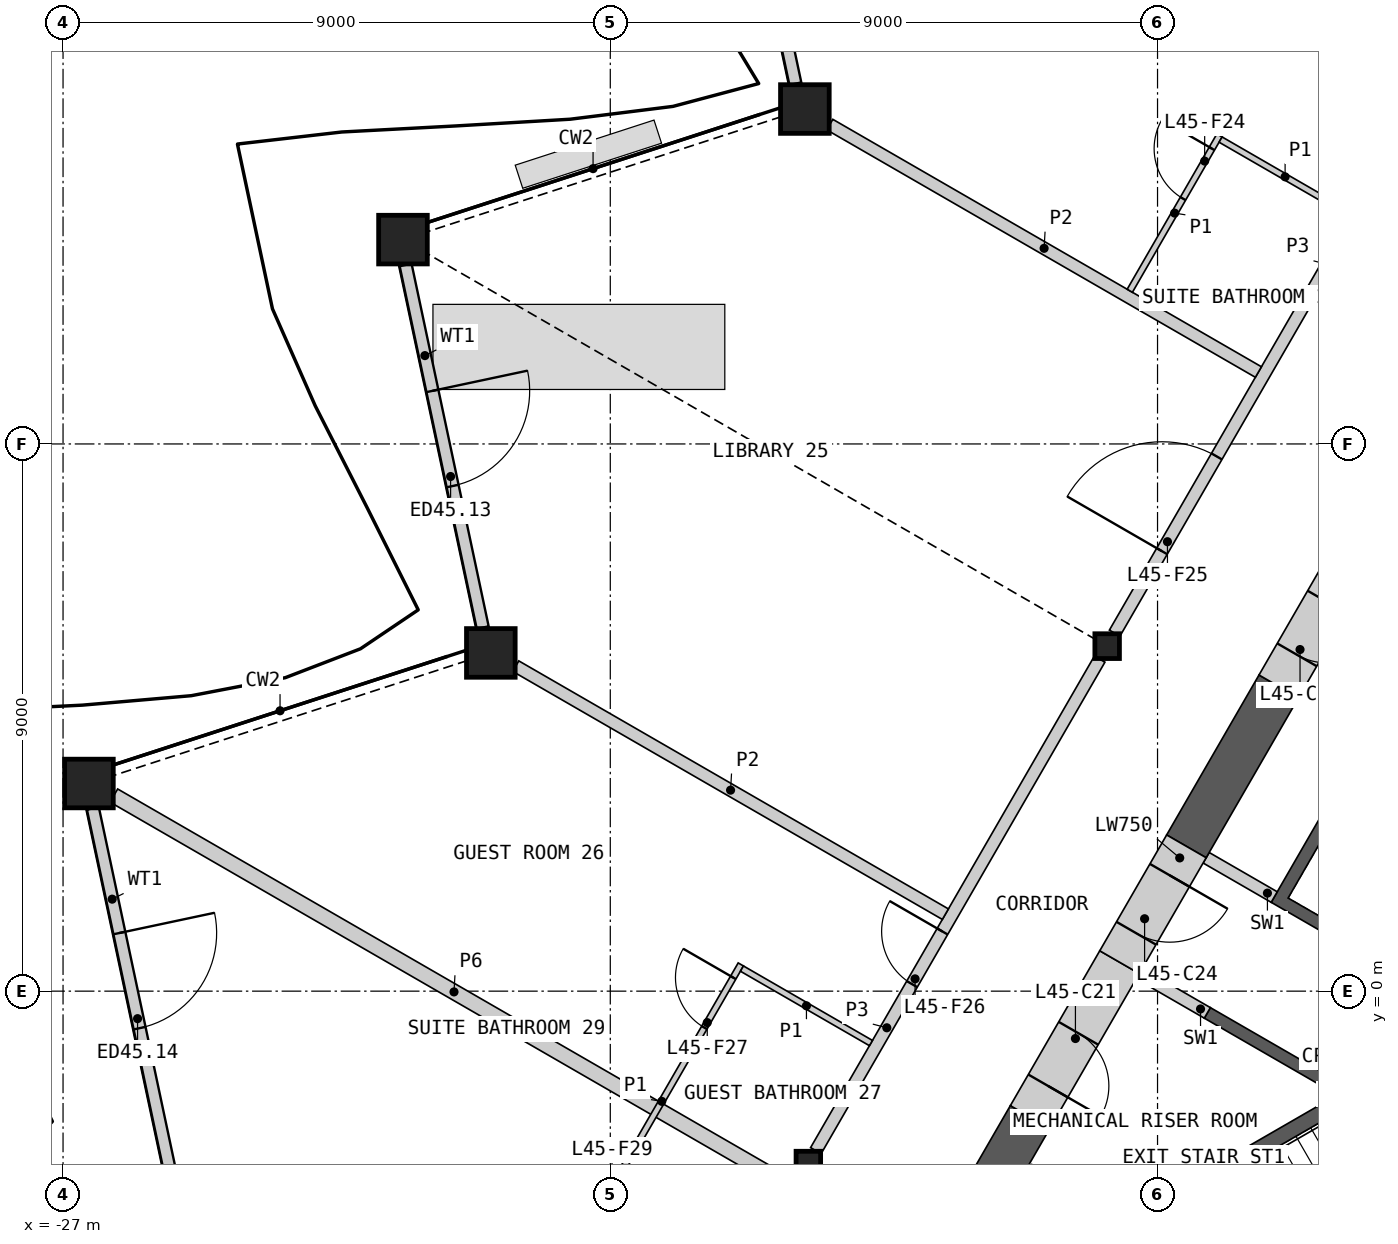
"""IFC4 building model, lengths in metres.
Left out: names, types, materials, properties, quantities, classifications, styles, units other than length and angle.
Written with IfcOpenShell. Run it as: python <this file> out.ifc"""

import sys

from ifc_helpers import new_model, si_unit, direction, frame, frame_2d, origin, origin_2d, place, context, subcontext, project, spatial, polyline, rectangle, hollow_rectangle, i_section, outline, extrude, element, fill, save


model = new_model("IFC4")
c1 = context("Model", 3, precision=1e-05, world=origin(), true_north=direction((0.0, 1.0)))
c2 = subcontext(c1, "Body", "Model", "MODEL_VIEW")
j1 = project(units=[si_unit("LENGTHUNIT", "METRE"), si_unit("PLANEANGLEUNIT", "RADIAN")], contexts=[c1])
p1 = place(None, origin())
s1 = spatial("IfcSite", under=j1, at=p1, CompositionType="ELEMENT")
p2 = place(p1, origin())
s2 = spatial("IfcBuilding", under=s1, at=p2, CompositionType="ELEMENT")
p3 = place(p2, frame((0.0, 0.0, 205.2)))
s3 = spatial("IfcBuildingStorey", under=s2, at=p3, CompositionType="ELEMENT", Elevation=205.2)
for number, where, z_axis, x_axis in (
    (1, (-14.8, 14.508, 0.0), (0.0, 0.0, 1.0), (1.0, 0.0, 0.0)),
    (2, (-21.409, 12.361, 0.0), (0.0, 0.0, 1.0), (1.0, 0.0, 0.0)),
    (3, (-19.965, 5.563, 0.0), (0.0, 0.0, 1.0), (1.0, 0.0, 0.0)),
    (4, (-26.574, 3.415, 0.0), (0.0, 0.0, 1.0), (1.0, 0.0, 0.0)),
):
    element("IfcColumn", number, at=place(p3, frame(where, z_axis=z_axis, x_axis=x_axis)), inside=s3, PredefinedType="COLUMN", context=c2, shape_type="SweptSolid", body=[
        extrude(hollow_rectangle(XDim=0.8, YDim=0.8, WallThickness=0.05, at=origin_2d()), origin(), (0.0, 0.0, 1.0), 3.6),
    ])
for number, where, z_axis, x_axis in (
    (5, (-9.828, 5.675, 0.0), (0.0, 0.0, 1.0), (1.0, 0.0, 0.0)),
    (6, (-14.743, -2.837, 0.0), (0.0, 0.0, 1.0), (1.0, 0.0, 0.0)),
):
    element("IfcColumn", number, at=place(p3, frame(where, z_axis=z_axis, x_axis=x_axis)), inside=s3, PredefinedType="COLUMN", context=c2, shape_type="SweptSolid", body=[
        extrude(i_section(OverallWidth=0.404, OverallDepth=0.407, WebThickness=0.027, FlangeThickness=0.044, at=origin_2d()), origin(), (0.0, 0.0, 1.0), 3.6),
    ])
p4 = place(p3, frame((-16.224, 20.89, 0.0), z_axis=(0.0, 0.0, 1.0), x_axis=(0.207912864597, -0.978147351238, 0.0)))
e7 = element("IfcWall", 7, at=p4, inside=s3, PredefinedType="SOLIDWALL", context=c2, shape_type="SweptSolid", body=[
    extrude(rectangle(XDim=6.098, YDim=0.2, at=frame_2d((3.049, 0.0))), origin(), (0.0, 0.0, 1.0), 2.701),
])
p5 = place(p4, frame((2.147, 0.0, 0.0)))
e8 = element("IfcOpeningElement", 8, at=p5, cuts=e7, PredefinedType="OPENING", context=c2, shape_type="SweptSolid", body=[
    extrude(rectangle(XDim=1.6, YDim=2.4, at=frame_2d((0.8, 1.2))), frame((0.0, 0.11, 0.0), z_axis=(0.0, -1.0, 0.0), x_axis=(1.0, 0.0, 0.0)), (0.0, 0.0, 1.0), 0.22),
])
p6 = place(p3, frame((-21.366, 11.944, 0.0), z_axis=(0.0, 0.0, 1.0), x_axis=(0.207912864597, -0.978147351238, 0.0)))
e9 = element("IfcWall", 9, at=p6, inside=s3, PredefinedType="SOLIDWALL", context=c2, shape_type="SweptSolid", body=[
    extrude(rectangle(XDim=6.098, YDim=0.2, at=frame_2d((3.049, 0.0))), origin(), (0.0, 0.0, 1.0), 2.701),
])
p7 = place(p6, frame((2.117, 0.0, 0.0)))
e10 = element("IfcOpeningElement", 10, at=p7, cuts=e9, PredefinedType="OPENING", context=c2, shape_type="SweptSolid", body=[
    extrude(rectangle(XDim=1.6, YDim=2.4, at=frame_2d((0.8, 1.2))), frame((0.0, 0.11, 0.0), z_axis=(0.0, -1.0, 0.0), x_axis=(1.0, 0.0, 0.0)), (0.0, 0.0, 1.0), 0.22),
])
p8 = place(p3, frame((-26.51, 3.006, 0.0), z_axis=(0.0, 0.0, 1.0), x_axis=(0.207920445063, -0.978145739921, 0.0)))
e11 = element("IfcWall", 11, at=p8, inside=s3, PredefinedType="SOLIDWALL", context=c2, shape_type="SweptSolid", body=[
    extrude(rectangle(XDim=6.106, YDim=0.2, at=frame_2d((3.053, 0.0))), origin(), (0.0, 0.0, 1.0), 2.701),
])
p9 = place(p8, frame((2.096, 0.0, 0.0)))
e12 = element("IfcOpeningElement", 12, at=p9, cuts=e11, PredefinedType="OPENING", context=c2, shape_type="SweptSolid", body=[
    extrude(rectangle(XDim=1.6, YDim=2.4, at=frame_2d((0.8, 1.2))), frame((0.0, 0.11, 0.0), z_axis=(0.0, -1.0, 0.0), x_axis=(1.0, 0.0, 0.0)), (0.0, 0.0, 1.0), 0.22),
])
p10 = place(p3, origin())
e13 = element("IfcWall", 13, at=p10, inside=s3, PredefinedType="SHEAR", context=c2, shape_type="SweptSolid", body=[
    extrude(outline(polyline([(-6.061, -1.697), (-8.231, -0.444), (-8.131, -0.271), (-5.96, -1.524), (-6.061, -1.697)])), origin(), (0.0, 0.0, 1.0), 3.25),
])
p11 = place(p3, origin())
e14 = element("IfcWall", 14, at=p11, inside=s3, PredefinedType="SHEAR", context=c2, shape_type="SweptSolid", body=[
    extrude(outline(polyline([(-4.96, 0.208), (-7.131, 1.461), (-3.731, 7.35), (-1.561, 6.097), (-1.66, 5.924), (-3.652, 7.074), (-4.652, 5.342), (-2.66, 4.192), (-2.76, 4.019), (-4.752, 5.169), (-5.752, 3.437), (-3.76, 2.287), (-3.861, 2.113), (-5.852, 3.263), (-6.852, 1.531), (-4.861, 0.381), (-4.96, 0.208)])), origin(), (0.0, 0.0, 1.0), 3.25),
])
for number, where, z_axis, x_axis in (
    (15, (-7.081, 1.548, 0.0), (0.0, 0.0, 1.0), (-0.866, 0.5, 0.0)),
    (16, (-8.181, -0.357, 0.0), (0.0, 0.0, 1.0), (-0.866, 0.5, 0.0)),
):
    element("IfcWall", number, at=place(p3, frame(where, z_axis=z_axis, x_axis=x_axis)), inside=s3, PredefinedType="SHEAR", context=c2, shape_type="SweptSolid", body=[
        extrude(rectangle(XDim=1.293, YDim=0.2, at=frame_2d((0.646, 0.0))), origin(), (0.0, 0.0, 1.0), 3.25),
    ])
p12 = place(p3, origin())
e17 = element("IfcWall", 17, at=p12, inside=s3, PredefinedType="SHEAR", context=c2, shape_type="SweptSolid", body=[
    extrude(outline(polyline([(-5.307, -1.281), (-10.374, -4.206), (-10.032, -4.298), (-5.182, -1.498), (-5.307, -1.281)])), origin(), (0.0, 0.0, 1.0), 3.25),
])
p13 = place(p3, frame((-7.006, 5.012, 0.0), z_axis=(0.0, 0.0, 1.0), x_axis=(-0.49996826437, -0.866043725583, 0.0)))
e18 = element("IfcWall", 18, at=p13, inside=s3, PredefinedType="SHEAR", context=c2, shape_type="SweptSolid", body=[
    extrude(rectangle(XDim=3.038, YDim=0.75, at=frame_2d((1.519, 0.0))), origin(), (0.0, 0.0, 1.0), 3.25),
])
p14 = place(p3, frame((-11.096, -2.07, 0.0), z_axis=(0.0, 0.0, 1.0), x_axis=(-0.49992834617, -0.86606676919, 0.0)))
e19 = element("IfcWall", 19, at=p14, inside=s3, PredefinedType="SHEAR", context=c2, shape_type="SweptSolid", body=[
    extrude(rectangle(XDim=2.737, YDim=0.75, at=frame_2d((1.369, 0.0))), origin(), (0.0, 0.0, 1.0), 3.25),
])
p15 = place(p3, frame((-5.906, 6.918, 0.0), z_axis=(0.0, 0.0, 1.0), x_axis=(-0.499946605688, -0.86605622881, 0.0)))
e20 = element("IfcWall", 20, at=p15, inside=s3, PredefinedType="SHEAR", context=c2, shape_type="SweptSolid", body=[
    extrude(rectangle(XDim=2.2, YDim=0.75, at=frame_2d((1.1, 0.0))), origin(), (0.0, 0.0, 1.0), 3.25),
])
p16 = place(p15, frame((0.6, 0.0, 0.0)))
e21 = element("IfcOpeningElement", 21, at=p16, cuts=e20, PredefinedType="OPENING", context=c2, shape_type="SweptSolid", body=[
    extrude(rectangle(XDim=1.0, YDim=2.1, at=frame_2d((0.5, 1.05))), frame((0.0, 0.385, 0.0), z_axis=(0.0, -1.0, 0.0), x_axis=(1.0, 0.0, 0.0)), (0.0, 0.0, 1.0), 0.77),
])
p17 = place(p3, frame((-9.625, 0.477, 0.0), z_axis=(0.0, 0.0, 1.0), x_axis=(-0.500005104963, -0.866022456413, 0.0)))
e22 = element("IfcWall", 22, at=p17, inside=s3, PredefinedType="SHEAR", context=c2, shape_type="SweptSolid", body=[
    extrude(rectangle(XDim=2.941, YDim=0.75, at=frame_2d((1.47, 0.0))), origin(), (0.0, 0.0, 1.0), 3.25),
])
p18 = place(p17, frame((1.35, 0.0, 0.0)))
e23 = element("IfcOpeningElement", 23, at=p18, cuts=e22, PredefinedType="OPENING", context=c2, shape_type="SweptSolid", body=[
    extrude(rectangle(XDim=1.0, YDim=2.1, at=frame_2d((0.5, 1.05))), frame((0.0, 0.385, 0.0), z_axis=(0.0, -1.0, 0.0), x_axis=(1.0, 0.0, 0.0)), (0.0, 0.0, 1.0), 0.77),
])
p19 = place(p3, frame((-8.525, 2.382, 0.0), z_axis=(0.0, 0.0, 1.0), x_axis=(-0.500077893725, -0.86598042715, 0.0)))
e24 = element("IfcWall", 24, at=p19, inside=s3, PredefinedType="SHEAR", context=c2, shape_type="SweptSolid", body=[
    extrude(rectangle(XDim=2.2, YDim=0.75, at=frame_2d((1.1, 0.0))), origin(), (0.0, 0.0, 1.0), 3.25),
])
p20 = place(p19, frame((0.55, 0.0, 0.0)))
e25 = element("IfcOpeningElement", 25, at=p20, cuts=e24, PredefinedType="OPENING", context=c2, shape_type="SweptSolid", body=[
    extrude(rectangle(XDim=1.1, YDim=2.1, at=frame_2d((0.55, 1.05))), frame((0.0, 0.385, 0.0), z_axis=(0.0, -1.0, 0.0), x_axis=(1.0, 0.0, 0.0)), (0.0, 0.0, 1.0), 0.77),
])
p21 = place(p3, frame((-26.164, 3.217, 0.0), z_axis=(0.0, 0.0, 1.0), x_axis=(0.866026026416, -0.499998921569, 0.0)))
e26 = element("IfcWall", 26, at=p21, inside=s3, PredefinedType="PARTITIONING", context=c2, shape_type="SweptSolid", body=[
    extrude(rectangle(XDim=12.918, YDim=0.25, at=frame_2d((6.459, 0.0))), origin(), (0.0, 0.0, 1.0), 2.404),
])
p22 = place(p3, frame((-9.705, 5.888, 0.0), z_axis=(0.0, 0.0, 1.0), x_axis=(0.50000393355, 0.866023132736, 0.0)))
e27 = element("IfcWall", 27, at=p22, inside=s3, PredefinedType="PARTITIONING", context=c2, shape_type="SweptSolid", body=[
    extrude(rectangle(XDim=9.335, YDim=0.2, at=frame_2d((4.667, 0.0))), origin(), (0.0, 0.0, 1.0), 3.25),
])
p23 = place(p22, frame((1.556, 0.0, 0.0)))
e28 = element("IfcOpeningElement", 28, at=p23, cuts=e27, PredefinedType="OPENING", context=c2, shape_type="SweptSolid", body=[
    extrude(rectangle(XDim=1.8, YDim=2.1, at=frame_2d((0.9, 1.05))), frame((0.0, 0.11, 0.0), z_axis=(0.0, -1.0, 0.0), x_axis=(1.0, 0.0, 0.0)), (0.0, 0.0, 1.0), 0.22),
])
p24 = place(p3, frame((-14.619, -2.624, 0.0), z_axis=(0.0, 0.0, 1.0), x_axis=(0.50000393355, 0.866023132736, 0.0)))
e29 = element("IfcWall", 29, at=p24, inside=s3, PredefinedType="PARTITIONING", context=c2, shape_type="SweptSolid", body=[
    extrude(rectangle(XDim=9.335, YDim=0.2, at=frame_2d((4.667, 0.0))), origin(), (0.0, 0.0, 1.0), 3.25),
])
p25 = place(p24, frame((3.163, 0.0, 0.0)))
e30 = element("IfcOpeningElement", 30, at=p25, cuts=e29, PredefinedType="OPENING", context=c2, shape_type="SweptSolid", body=[
    extrude(rectangle(XDim=1.0, YDim=2.1, at=frame_2d((0.5, 1.05))), frame((0.0, 0.11, 0.0), z_axis=(0.0, -1.0, 0.0), x_axis=(1.0, 0.0, 0.0)), (0.0, 0.0, 1.0), 0.22),
])
p26 = place(p3, frame((-19.555, 5.345, 0.0), z_axis=(0.0, 0.0, 1.0), x_axis=(0.866026623601, -0.49999788721, 0.0)))
e31 = element("IfcWall", 31, at=p26, inside=s3, PredefinedType="PARTITIONING", context=c2, shape_type="SweptSolid", body=[
    extrude(rectangle(XDim=8.159, YDim=0.2, at=frame_2d((4.079, 0.0))), origin(), (0.0, 0.0, 1.0), 2.404),
])
p27 = place(p3, frame((-14.39, 14.252, 0.0), z_axis=(0.0, 0.0, 1.0), x_axis=(0.866028741424, -0.499994218994, 0.0)))
e32 = element("IfcWall", 32, at=p27, inside=s3, PredefinedType="PARTITIONING", context=c2, shape_type="SweptSolid", body=[
    extrude(rectangle(XDim=8.139, YDim=0.2, at=frame_2d((4.07, 0.0))), origin(), (0.0, 0.0, 1.0), 2.404),
])
p28 = place(p3, frame((-18.453, -4.064, 0.0), z_axis=(0.0, 0.0, 1.0), x_axis=(0.499971721724, 0.866041729639, 0.0)))
e33 = element("IfcWall", 33, at=p28, inside=s3, PredefinedType="PARTITIONING", context=c2, shape_type="SweptSolid", body=[
    extrude(rectangle(XDim=5.2, YDim=0.1, at=frame_2d((2.6, 0.0))), origin(), (0.0, 0.0, 1.0), 2.404),
])
p29 = place(p28, frame((4.0, 0.0, 0.0)))
e34 = element("IfcOpeningElement", 34, at=p29, cuts=e33, PredefinedType="OPENING", context=c2, shape_type="SweptSolid", body=[
    extrude(rectangle(XDim=0.95, YDim=2.1, at=frame_2d((0.475, 1.05))), frame((0.0, 0.06, 0.0), z_axis=(0.0, -1.0, 0.0), x_axis=(1.0, 0.0, 0.0)), (0.0, 0.0, 1.0), 0.12),
])
p30 = place(p28, frame((0.25, 0.0, 0.0)))
e35 = element("IfcOpeningElement", 35, at=p30, cuts=e33, PredefinedType="OPENING", context=c2, shape_type="SweptSolid", body=[
    extrude(rectangle(XDim=0.95, YDim=2.1, at=frame_2d((0.475, 1.05))), frame((0.0, 0.06, 0.0), z_axis=(0.0, -1.0, 0.0), x_axis=(1.0, 0.0, 0.0)), (0.0, 0.0, 1.0), 0.12),
])
p31 = place(p3, frame((-9.456, 11.519, 0.0), z_axis=(0.0, 0.0, 1.0), x_axis=(0.499939757307, 0.866060182126, 0.0)))
e36 = element("IfcWall", 36, at=p31, inside=s3, PredefinedType="PARTITIONING", context=c2, shape_type="SweptSolid", body=[
    extrude(rectangle(XDim=2.95, YDim=0.1, at=frame_2d((1.475, 0.0))), origin(), (0.0, 0.0, 1.0), 2.404),
])
p32 = place(p31, frame((1.75, 0.0, 0.0)))
e37 = element("IfcOpeningElement", 37, at=p32, cuts=e36, PredefinedType="OPENING", context=c2, shape_type="SweptSolid", body=[
    extrude(rectangle(XDim=0.95, YDim=2.1, at=frame_2d((0.475, 1.05))), frame((0.0, 0.06, 0.0), z_axis=(0.0, -1.0, 0.0), x_axis=(1.0, 0.0, 0.0)), (0.0, 0.0, 1.0), 0.12),
])
p33 = place(p3, frame((-7.963, 14.006, 0.0), z_axis=(0.0, 0.0, 1.0), x_axis=(0.866057815567, -0.499943856944, 0.0)))
e38 = element("IfcWall", 38, at=p33, inside=s3, PredefinedType="PARTITIONING", context=c2, shape_type="SweptSolid", body=[
    extrude(rectangle(XDim=2.45, YDim=0.1, at=frame_2d((1.225, 0.0))), origin(), (0.0, 0.0, 1.0), 2.404),
])
p34 = place(p3, frame((-15.835, 0.371, 0.0), z_axis=(0.0, 0.0, 1.0), x_axis=(0.866014668023, -0.500018594424, 0.0)))
e39 = element("IfcWall", 39, at=p34, inside=s3, PredefinedType="PARTITIONING", context=c2, shape_type="SweptSolid", body=[
    extrude(rectangle(XDim=2.45, YDim=0.1, at=frame_2d((1.225, 0.0))), origin(), (0.0, 0.0, 1.0), 2.404),
])
p35 = place(p7, origin())
e40 = element("IfcDoor", 40, at=p35, inside=s3, OperationType="DOUBLE_DOOR_SINGLE_SWING", PredefinedType="DOOR", context=c2, shape_type="SweptSolid", body=[
    extrude(rectangle(XDim=1.6, YDim=2.4, at=frame_2d((0.8, 1.2))), frame((0.0, 0.025, 0.0), z_axis=(0.0, -1.0, 0.0), x_axis=(1.0, 0.0, 0.0)), (0.0, 0.0, 1.0), 0.05),
])
fill(e10, e40)
p36 = place(p9, origin())
e41 = element("IfcDoor", 41, at=p36, inside=s3, OperationType="DOUBLE_DOOR_SINGLE_SWING", PredefinedType="DOOR", context=c2, shape_type="SweptSolid", body=[
    extrude(rectangle(XDim=1.6, YDim=2.4, at=frame_2d((0.8, 1.2))), frame((0.0, 0.025, 0.0), z_axis=(0.0, -1.0, 0.0), x_axis=(1.0, 0.0, 0.0)), (0.0, 0.0, 1.0), 0.05),
])
fill(e12, e41)
p37 = place(p16, origin())
e42 = element("IfcDoor", 42, at=p37, inside=s3, OperationType="SINGLE_SWING_LEFT", PredefinedType="DOOR", context=c2, shape_type="SweptSolid", body=[
    extrude(rectangle(XDim=1.0, YDim=2.1, at=frame_2d((0.5, 1.05))), frame((0.0, 0.13, 0.0), z_axis=(0.0, -1.0, 0.0), x_axis=(1.0, 0.0, 0.0)), (0.0, 0.0, 1.0), 0.05),
])
fill(e21, e42)
p38 = place(p18, origin())
e43 = element("IfcDoor", 43, at=p38, inside=s3, OperationType="SINGLE_SWING_RIGHT", PredefinedType="DOOR", context=c2, shape_type="SweptSolid", body=[
    extrude(rectangle(XDim=1.0, YDim=2.1, at=frame_2d((0.5, 1.05))), frame((0.0, 0.13, 0.0), z_axis=(0.0, -1.0, 0.0), x_axis=(1.0, 0.0, 0.0)), (0.0, 0.0, 1.0), 0.05),
])
fill(e23, e43)
p39 = place(p20, origin())
e44 = element("IfcDoor", 44, at=p39, inside=s3, OperationType="SINGLE_SWING_LEFT", PredefinedType="DOOR", context=c2, shape_type="SweptSolid", body=[
    extrude(rectangle(XDim=1.1, YDim=2.1, at=frame_2d((0.55, 1.05))), frame((0.0, 0.13, 0.0), z_axis=(0.0, -1.0, 0.0), x_axis=(1.0, 0.0, 0.0)), (0.0, 0.0, 1.0), 0.05),
])
fill(e25, e44)
p40 = place(p32, origin())
e45 = element("IfcDoor", 45, at=p40, inside=s3, OperationType="SINGLE_SWING_RIGHT", PredefinedType="DOOR", context=c2, shape_type="SweptSolid", body=[
    extrude(rectangle(XDim=0.95, YDim=2.1, at=frame_2d((0.475, 1.05))), frame((0.0, 0.025, 0.0), z_axis=(0.0, -1.0, 0.0), x_axis=(1.0, 0.0, 0.0)), (0.0, 0.0, 1.0), 0.05),
])
fill(e37, e45)
p41 = place(p23, origin())
e46 = element("IfcDoor", 46, at=p41, inside=s3, OperationType="DOUBLE_DOOR_SINGLE_SWING", PredefinedType="DOOR", context=c2, shape_type="SweptSolid", body=[
    extrude(rectangle(XDim=1.8, YDim=2.1, at=frame_2d((0.9, 1.05))), frame((0.0, 0.025, 0.0), z_axis=(0.0, -1.0, 0.0), x_axis=(1.0, 0.0, 0.0)), (0.0, 0.0, 1.0), 0.05),
])
fill(e28, e46)
p42 = place(p25, origin())
e47 = element("IfcDoor", 47, at=p42, inside=s3, OperationType="SINGLE_SWING_RIGHT", PredefinedType="DOOR", context=c2, shape_type="SweptSolid", body=[
    extrude(rectangle(XDim=1.0, YDim=2.1, at=frame_2d((0.5, 1.05))), frame((0.0, 0.025, 0.0), z_axis=(0.0, -1.0, 0.0), x_axis=(1.0, 0.0, 0.0)), (0.0, 0.0, 1.0), 0.05),
])
fill(e30, e47)
p43 = place(p29, origin())
e48 = element("IfcDoor", 48, at=p43, inside=s3, OperationType="SINGLE_SWING_RIGHT", PredefinedType="DOOR", context=c2, shape_type="SweptSolid", body=[
    extrude(rectangle(XDim=0.95, YDim=2.1, at=frame_2d((0.475, 1.05))), frame((0.0, 0.025, 0.0), z_axis=(0.0, -1.0, 0.0), x_axis=(1.0, 0.0, 0.0)), (0.0, 0.0, 1.0), 0.05),
])
fill(e34, e48)
save(model, sys.argv[1])
